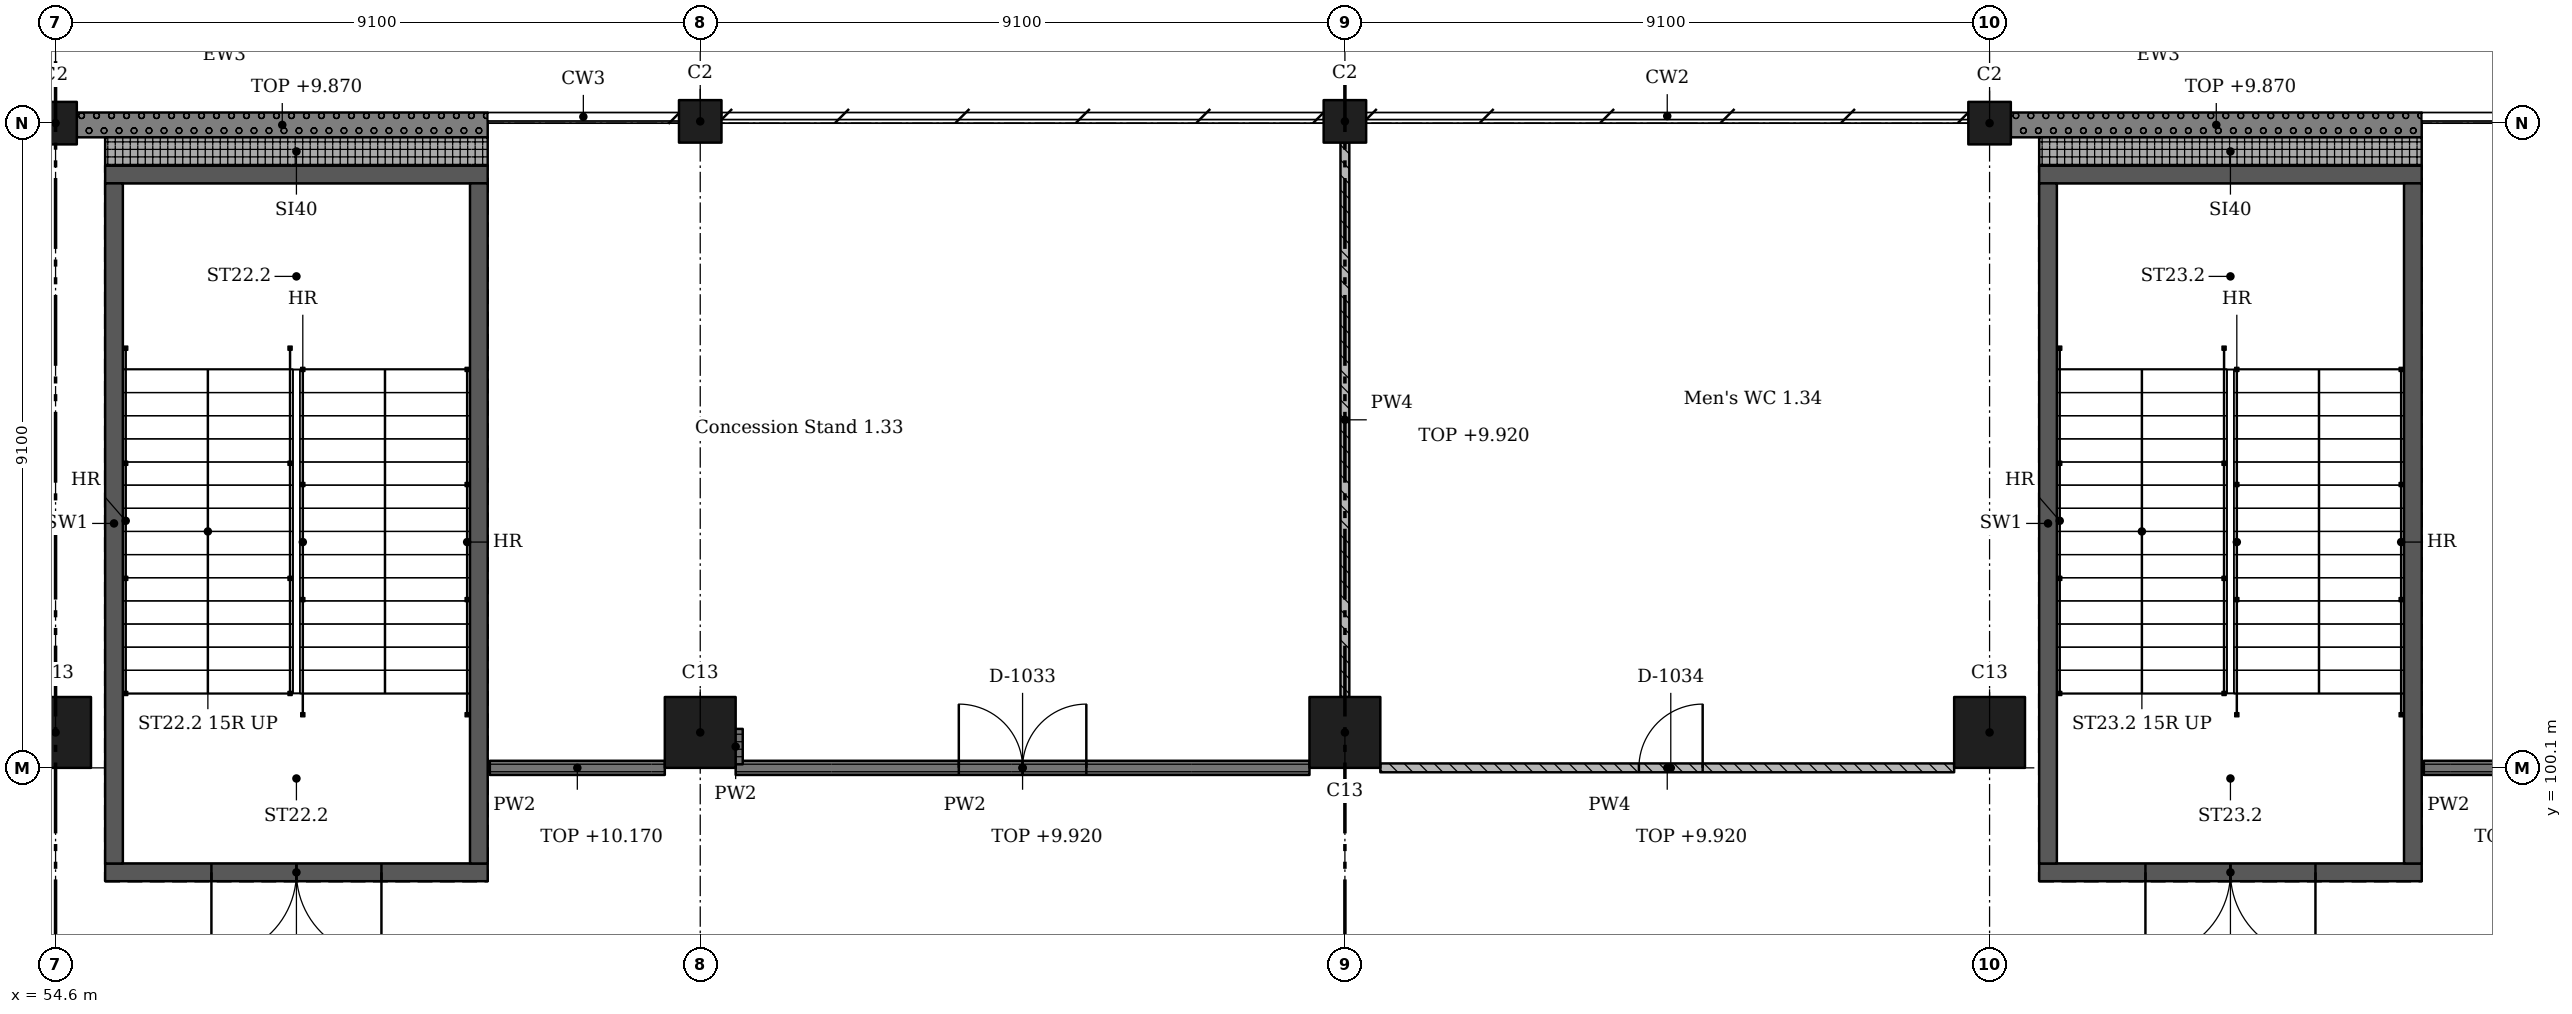
"""IFC4 building model, lengths in metres.
Left out: names, types, materials, properties, quantities, classifications, styles, units other than length and angle.
Written with IfcOpenShell. Run it as: python <this file> out.ifc"""

import sys

from ifc_helpers import new_model, si_unit, direction, frame, frame_2d, origin, origin_2d, place, context, subcontext, project, spatial, rectangle, extrude, element, fill, save


model = new_model("IFC4")
c1 = context("Model", 3, precision=1e-05, world=origin(), true_north=direction((0.0, 1.0)))
c2 = subcontext(c1, "Body", "Model", "MODEL_VIEW")
j1 = project(units=[si_unit("LENGTHUNIT", "METRE"), si_unit("PLANEANGLEUNIT", "RADIAN")], contexts=[c1])
p1 = place(None, origin())
s1 = spatial("IfcSite", under=j1, at=p1, CompositionType="ELEMENT")
p2 = place(p1, origin())
s2 = spatial("IfcBuilding", under=s1, at=p2, CompositionType="ELEMENT")
p3 = place(p2, frame((0.0, 0.0, 6.37)))
s3 = spatial("IfcBuildingStorey", under=s2, at=p3, CompositionType="ELEMENT", Elevation=6.37)
p4 = place(p3, frame((54.6, 100.6, 0.0), z_axis=(0.0, 0.0, 1.0), x_axis=(1.0, 0.0, 0.0)))
e1 = element("IfcColumn", 1, at=p4, inside=s3, PredefinedType="COLUMN", context=c2, shape_type="SweptSolid", body=[
    extrude(rectangle(XDim=1.0, YDim=1.0, at=origin_2d()), origin(), (0.0, 0.0, 1.0), 4.55),
])
p5 = place(p3, frame((54.6, 109.2, 0.0), z_axis=(0.0, 0.0, 1.0), x_axis=(1.0, 0.0, 0.0)))
e2 = element("IfcColumn", 2, at=p5, inside=s3, PredefinedType="COLUMN", context=c2, shape_type="SweptSolid", body=[
    extrude(rectangle(XDim=0.6, YDim=0.6, at=origin_2d()), origin(), (0.0, 0.0, 1.0), 4.55),
])
p6 = place(p3, frame((63.7, 100.6, 0.0), z_axis=(0.0, 0.0, 1.0), x_axis=(1.0, 0.0, 0.0)))
e3 = element("IfcColumn", 3, at=p6, inside=s3, PredefinedType="COLUMN", context=c2, shape_type="SweptSolid", body=[
    extrude(rectangle(XDim=1.0, YDim=1.0, at=origin_2d()), origin(), (0.0, 0.0, 1.0), 4.55),
])
p7 = place(p3, frame((63.7, 109.225, 0.0), z_axis=(0.0, 0.0, 1.0), x_axis=(1.0, 0.0, 0.0)))
e4 = element("IfcColumn", 4, at=p7, inside=s3, PredefinedType="COLUMN", context=c2, shape_type="SweptSolid", body=[
    extrude(rectangle(XDim=0.6, YDim=0.6, at=origin_2d()), origin(), (0.0, 0.0, 1.0), 4.55),
])
p8 = place(p3, frame((72.8, 100.6, 0.0), z_axis=(0.0, 0.0, 1.0), x_axis=(1.0, 0.0, 0.0)))
e5 = element("IfcColumn", 5, at=p8, inside=s3, PredefinedType="COLUMN", context=c2, shape_type="SweptSolid", body=[
    extrude(rectangle(XDim=1.0, YDim=1.0, at=origin_2d()), origin(), (0.0, 0.0, 1.0), 4.55),
])
p9 = place(p3, frame((72.8, 109.225, 0.0), z_axis=(0.0, 0.0, 1.0), x_axis=(1.0, 0.0, 0.0)))
e6 = element("IfcColumn", 6, at=p9, inside=s3, PredefinedType="COLUMN", context=c2, shape_type="SweptSolid", body=[
    extrude(rectangle(XDim=0.6, YDim=0.6, at=origin_2d()), origin(), (0.0, 0.0, 1.0), 4.55),
])
p10 = place(p3, frame((81.9, 100.6, 0.0), z_axis=(0.0, 0.0, 1.0), x_axis=(1.0, 0.0, 0.0)))
e7 = element("IfcColumn", 7, at=p10, inside=s3, PredefinedType="COLUMN", context=c2, shape_type="SweptSolid", body=[
    extrude(rectangle(XDim=1.0, YDim=1.0, at=origin_2d()), origin(), (0.0, 0.0, 1.0), 4.55),
])
p11 = place(p3, frame((81.9, 109.2, 0.0), z_axis=(0.0, 0.0, 1.0), x_axis=(1.0, 0.0, 0.0)))
e8 = element("IfcColumn", 8, at=p11, inside=s3, PredefinedType="COLUMN", context=c2, shape_type="SweptSolid", body=[
    extrude(rectangle(XDim=0.6, YDim=0.6, at=origin_2d()), origin(), (0.0, 0.0, 1.0), 4.55),
])
p12 = place(p3, frame((60.7, 98.625, 0.0), z_axis=(0.0, 0.0, 1.0), x_axis=(-1.0, 0.0, 0.0)))
e9 = element("IfcWall", 9, at=p12, inside=s3, PredefinedType="SHEAR", context=c2, shape_type="SweptSolid", body=[
    extrude(rectangle(XDim=5.4, YDim=0.25, at=frame_2d((2.7, 0.0))), origin(), (0.0, 0.0, 1.0), 4.55),
])
p13 = place(p12, frame((1.5, 0.0, 0.0)))
e10 = element("IfcOpeningElement", 10, at=p13, cuts=e9, PredefinedType="OPENING", context=c2, shape_type="SweptSolid", body=[
    extrude(rectangle(XDim=2.4, YDim=2.1, at=frame_2d((1.2, 1.05))), frame((0.0, 0.135, 0.0), z_axis=(0.0, -1.0, 0.0), x_axis=(1.0, 0.0, 0.0)), (0.0, 0.0, 1.0), 0.27),
])
p14 = place(p3, frame((60.7, 108.475, 0.0), z_axis=(0.0, 0.0, 1.0), x_axis=(-1.0, 0.0, 0.0)))
e11 = element("IfcWall", 11, at=p14, inside=s3, PredefinedType="SHEAR", context=c2, shape_type="SweptSolid", body=[
    extrude(rectangle(XDim=5.4, YDim=0.25, at=frame_2d((2.7, 0.0))), origin(), (0.0, 0.0, 1.0), 4.55),
])
for number, where, z_axis, x_axis in (
    (12, (55.425, 108.35, 0.0), (0.0, 0.0, 1.0), (0.0, -1.0, 0.0)),
    (13, (60.575, 108.35, 0.0), (0.0, 0.0, 1.0), (0.0, -1.0, 0.0)),
):
    element("IfcWall", number, at=place(p3, frame(where, z_axis=z_axis, x_axis=x_axis)), inside=s3, PredefinedType="SHEAR", context=c2, shape_type="SweptSolid", body=[
        extrude(rectangle(XDim=9.6, YDim=0.25, at=frame_2d((4.8, 0.0))), origin(), (0.0, 0.0, 1.0), 4.55),
    ])
p15 = place(p3, frame((88.0, 98.625, 0.0), z_axis=(0.0, 0.0, 1.0), x_axis=(-1.0, 0.0, 0.0)))
e14 = element("IfcWall", 14, at=p15, inside=s3, PredefinedType="SHEAR", context=c2, shape_type="SweptSolid", body=[
    extrude(rectangle(XDim=5.4, YDim=0.25, at=frame_2d((2.7, 0.0))), origin(), (0.0, 0.0, 1.0), 4.55),
])
p16 = place(p15, frame((1.5, 0.0, 0.0)))
e15 = element("IfcOpeningElement", 15, at=p16, cuts=e14, PredefinedType="OPENING", context=c2, shape_type="SweptSolid", body=[
    extrude(rectangle(XDim=2.4, YDim=2.1, at=frame_2d((1.2, 1.05))), frame((0.0, 0.135, 0.0), z_axis=(0.0, -1.0, 0.0), x_axis=(1.0, 0.0, 0.0)), (0.0, 0.0, 1.0), 0.27),
])
p17 = place(p3, frame((88.0, 108.475, 0.0), z_axis=(0.0, 0.0, 1.0), x_axis=(-1.0, 0.0, 0.0)))
e16 = element("IfcWall", 16, at=p17, inside=s3, PredefinedType="SHEAR", context=c2, shape_type="SweptSolid", body=[
    extrude(rectangle(XDim=5.4, YDim=0.25, at=frame_2d((2.7, 0.0))), origin(), (0.0, 0.0, 1.0), 4.55),
])
for number, where, z_axis, x_axis in (
    (17, (82.725, 108.35, 0.0), (0.0, 0.0, 1.0), (0.0, -1.0, 0.0)),
    (18, (87.875, 108.35, 0.0), (0.0, 0.0, 1.0), (0.0, -1.0, 0.0)),
):
    element("IfcWall", number, at=place(p3, frame(where, z_axis=z_axis, x_axis=x_axis)), inside=s3, PredefinedType="SHEAR", context=c2, shape_type="SweptSolid", body=[
        extrude(rectangle(XDim=9.6, YDim=0.25, at=frame_2d((4.8, 0.0))), origin(), (0.0, 0.0, 1.0), 4.55),
    ])
for number, where, z_axis, x_axis in (
    (19, (88.0, 109.175, 0.0), (0.0, 0.0, 1.0), (-1.0, 0.0, 0.0)),
    (20, (60.7, 109.175, 0.0), (0.0, 0.0, 1.0), (-1.0, 0.0, 0.0)),
):
    element("IfcWall", number, at=place(p3, frame(where, z_axis=z_axis, x_axis=x_axis)), inside=s3, PredefinedType="SOLIDWALL", context=c2, shape_type="SweptSolid", body=[
        extrude(rectangle(XDim=5.8, YDim=0.35, at=frame_2d((2.9, 0.0))), origin(), (0.0, 0.0, 1.0), 3.5),
    ])
for number, where, z_axis, x_axis in (
    (21, (55.3, 108.8, 0.0), (0.0, 0.0, 1.0), (1.0, 0.0, 0.0)),
    (22, (82.6, 108.8, 0.0), (0.0, 0.0, 1.0), (1.0, 0.0, 0.0)),
):
    element("IfcWall", number, at=place(p3, frame(where, z_axis=z_axis, x_axis=x_axis)), inside=s3, PredefinedType="SOLIDWALL", context=c2, shape_type="SweptSolid", body=[
        extrude(rectangle(XDim=5.4, YDim=0.4, at=frame_2d((2.7, 0.0))), origin(), (0.0, 0.0, 1.0), 4.25),
    ])
p18 = place(p3, frame((60.73, 100.1, 0.0), z_axis=(0.0, 0.0, 1.0), x_axis=(1.0, 0.0, 0.0)))
e23 = element("IfcWall", 23, at=p18, inside=s3, PredefinedType="PARTITIONING", context=c2, shape_type="SweptSolid", body=[
    extrude(rectangle(XDim=2.47, YDim=0.2, at=frame_2d((1.235, 0.0))), origin(), (0.0, 0.0, 1.0), 3.8),
])
p19 = place(p3, frame((64.2, 100.1, 0.0), z_axis=(0.0, 0.0, 1.0), x_axis=(1.0, 0.0, 0.0)))
e24 = element("IfcWall", 24, at=p19, inside=s3, PredefinedType="PARTITIONING", context=c2, shape_type="SweptSolid", body=[
    extrude(rectangle(XDim=8.1, YDim=0.2, at=frame_2d((4.05, 0.0))), origin(), (0.0, 0.0, 1.0), 3.55),
])
p20 = place(p19, frame((3.15, 0.0, 0.0)))
e25 = element("IfcOpeningElement", 25, at=p20, cuts=e24, PredefinedType="OPENING", context=c2, shape_type="SweptSolid", body=[
    extrude(rectangle(XDim=1.8, YDim=2.1, at=frame_2d((0.9, 1.05))), frame((0.0, 0.11, 0.0), z_axis=(0.0, -1.0, 0.0), x_axis=(1.0, 0.0, 0.0)), (0.0, 0.0, 1.0), 0.22),
])
p21 = place(p3, frame((64.2, 100.65, 0.0), z_axis=(0.0, 0.0, 1.0), x_axis=(0.0, -1.0, 0.0)))
e26 = element("IfcWall", 26, at=p21, inside=s3, PredefinedType="PARTITIONING", context=c2, shape_type="SweptSolid", body=[
    extrude(rectangle(XDim=0.5, YDim=0.2, at=frame_2d((0.25, 0.0))), origin(), (0.0, 0.0, 1.0), 4.25),
])
p22 = place(p3, frame((72.8, 108.925, 0.0), z_axis=(0.0, 0.0, 1.0), x_axis=(0.0, -1.0, 0.0)))
e27 = element("IfcWall", 27, at=p22, inside=s3, PredefinedType="PARTITIONING", context=c2, shape_type="SweptSolid", body=[
    extrude(rectangle(XDim=7.825, YDim=0.125, at=frame_2d((3.913, 0.0))), origin(), (0.0, 0.0, 1.0), 3.55),
])
p23 = place(p3, frame((73.3, 100.1, 0.0), z_axis=(0.0, 0.0, 1.0), x_axis=(1.0, 0.0, 0.0)))
e28 = element("IfcWall", 28, at=p23, inside=s3, PredefinedType="PARTITIONING", context=c2, shape_type="SweptSolid", body=[
    extrude(rectangle(XDim=8.1, YDim=0.125, at=frame_2d((4.05, 0.0))), origin(), (0.0, 0.0, 1.0), 3.55),
])
p24 = place(p23, frame((3.65, 0.0, 0.0)))
e29 = element("IfcOpeningElement", 29, at=p24, cuts=e28, PredefinedType="OPENING", context=c2, shape_type="SweptSolid", body=[
    extrude(rectangle(XDim=0.9, YDim=2.1, at=frame_2d((0.45, 1.05))), frame((0.0, 0.073, 0.0), z_axis=(0.0, -1.0, 0.0), x_axis=(1.0, 0.0, 0.0)), (0.0, 0.0, 1.0), 0.145),
])
p25 = place(p3, frame((88.03, 100.1, 0.0), z_axis=(0.0, 0.0, 1.0), x_axis=(1.0, 0.0, 0.0)))
e30 = element("IfcWall", 30, at=p25, inside=s3, PredefinedType="PARTITIONING", context=c2, shape_type="SweptSolid", body=[
    extrude(rectangle(XDim=2.47, YDim=0.2, at=frame_2d((1.235, 0.0))), origin(), (0.0, 0.0, 1.0), 3.8),
])
p26 = place(p20, origin())
e31 = element("IfcDoor", 31, at=p26, inside=s3, OperationType="DOUBLE_DOOR_SINGLE_SWING", PredefinedType="DOOR", context=c2, shape_type="SweptSolid", body=[
    extrude(rectangle(XDim=1.8, YDim=2.1, at=frame_2d((0.9, 1.05))), frame((0.0, 0.025, 0.0), z_axis=(0.0, -1.0, 0.0), x_axis=(1.0, 0.0, 0.0)), (0.0, 0.0, 1.0), 0.05),
])
fill(e25, e31)
p27 = place(p24, origin())
e32 = element("IfcDoor", 32, at=p27, inside=s3, OperationType="SINGLE_SWING_LEFT", PredefinedType="DOOR", context=c2, shape_type="SweptSolid", body=[
    extrude(rectangle(XDim=0.9, YDim=2.1, at=frame_2d((0.45, 1.05))), frame((0.0, 0.025, 0.0), z_axis=(0.0, -1.0, 0.0), x_axis=(1.0, 0.0, 0.0)), (0.0, 0.0, 1.0), 0.05),
])
fill(e29, e32)
p28 = place(p13, origin())
e33 = element("IfcDoor", 33, at=p28, inside=s3, OperationType="DOUBLE_DOOR_SINGLE_SWING", PredefinedType="DOOR", context=c2, shape_type="SweptSolid", body=[
    extrude(rectangle(XDim=2.4, YDim=2.1, at=frame_2d((1.2, 1.05))), frame((0.0, 0.025, 0.0), z_axis=(0.0, -1.0, 0.0), x_axis=(1.0, 0.0, 0.0)), (0.0, 0.0, 1.0), 0.05),
])
fill(e10, e33)
p29 = place(p16, origin())
e34 = element("IfcDoor", 34, at=p29, inside=s3, OperationType="DOUBLE_DOOR_SINGLE_SWING", PredefinedType="DOOR", context=c2, shape_type="SweptSolid", body=[
    extrude(rectangle(XDim=2.4, YDim=2.1, at=frame_2d((1.2, 1.05))), frame((0.0, 0.025, 0.0), z_axis=(0.0, -1.0, 0.0), x_axis=(1.0, 0.0, 0.0)), (0.0, 0.0, 1.0), 0.05),
])
fill(e15, e34)
save(model, sys.argv[1])
